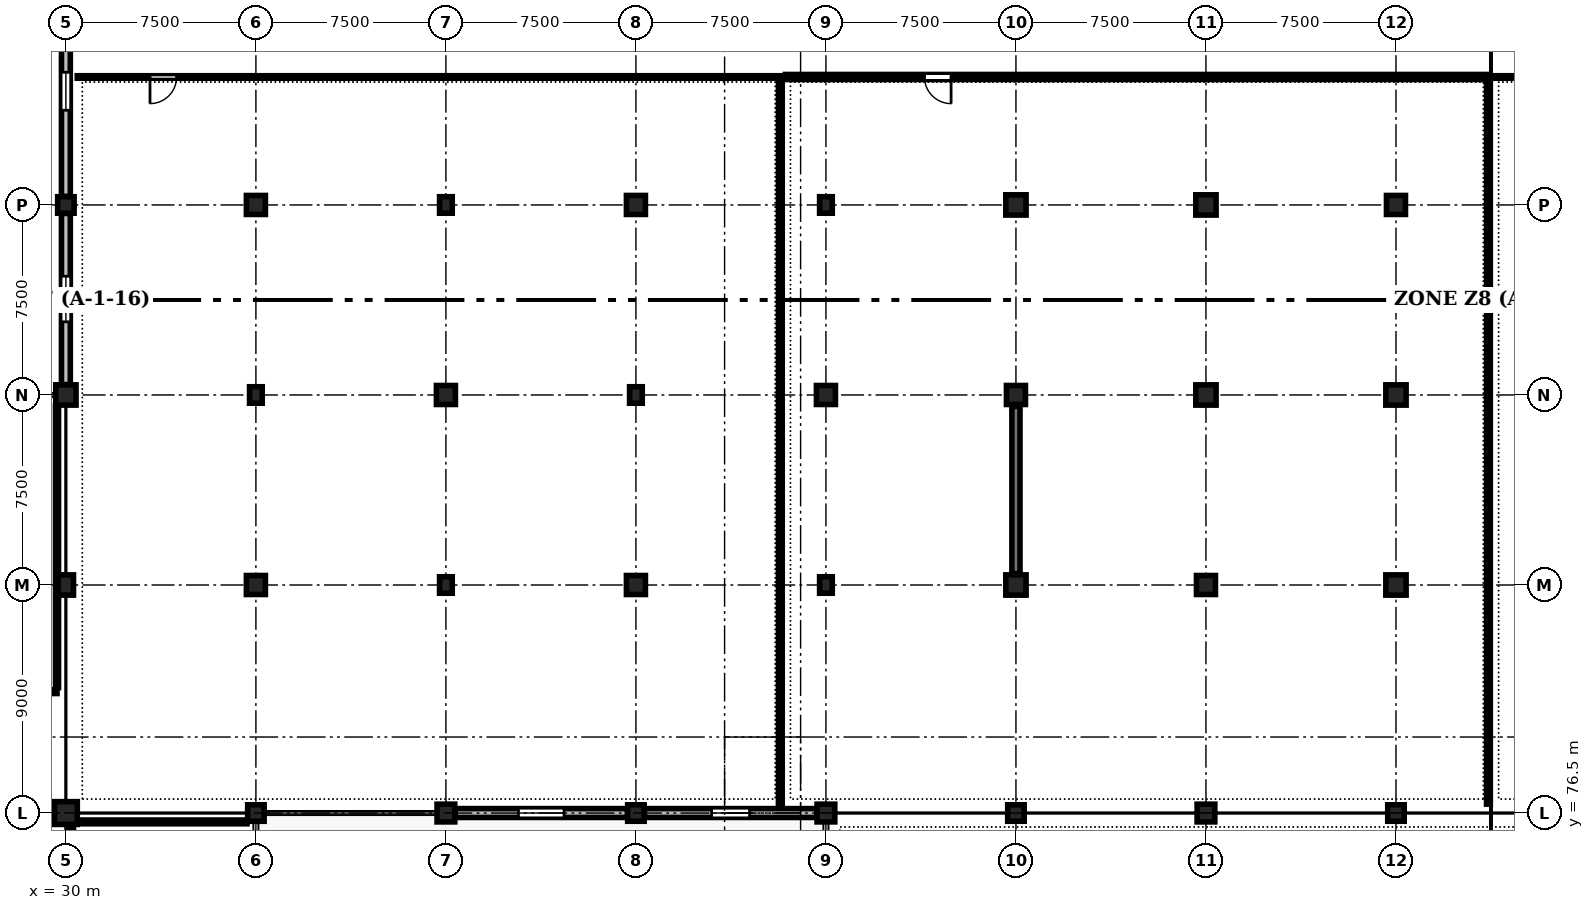
"""IFC4 building model, lengths in metres.
Left out: names, types, materials, properties, quantities, classifications, styles, units other than length and angle.
Written with IfcOpenShell. Run it as: python <this file> out.ifc"""

import sys

from ifc_helpers import new_model, si_unit, direction, frame, frame_2d, origin, origin_2d, place, context, subcontext, project, spatial, rectangle, circle, extrude, element, fill, save


model = new_model("IFC4")
c1 = context("Model", 3, precision=1e-05, world=origin(), true_north=direction((0.0, 1.0)))
c2 = subcontext(c1, "Body", "Model", "MODEL_VIEW")
j1 = project(units=[si_unit("LENGTHUNIT", "METRE"), si_unit("PLANEANGLEUNIT", "RADIAN")], contexts=[c1])
p1 = place(None, origin())
s1 = spatial("IfcSite", under=j1, at=p1, CompositionType="ELEMENT")
p2 = place(p1, origin())
s2 = spatial("IfcBuilding", under=s1, at=p2, CompositionType="ELEMENT")
p3 = place(p2, origin())
s3 = spatial("IfcBuildingStorey", under=s2, at=p3, CompositionType="ELEMENT", Elevation=0.0)
p4 = place(p3, frame((30.0, 76.5, 0.0), z_axis=(0.0, 0.0, 1.0), x_axis=(1.0, 0.0, 0.0)))
e1 = element("IfcColumn", 1, at=p4, inside=s3, PredefinedType="COLUMN", context=c2, shape_type="SweptSolid", body=[
    extrude(rectangle(XDim=0.9, YDim=0.9, at=origin_2d()), origin(), (0.0, 0.0, 1.0), 4.8),
])
p5 = place(p3, frame((30.0, 85.5, 0.0), z_axis=(0.0, 0.0, 1.0), x_axis=(1.0, 0.0, 0.0)))
e2 = element("IfcColumn", 2, at=p5, inside=s3, PredefinedType="COLUMN", context=c2, shape_type="SweptSolid", body=[
    extrude(rectangle(XDim=0.6, YDim=0.8, at=origin_2d()), origin(), (0.0, 0.0, 1.0), 4.8),
])
p6 = place(p3, frame((30.0, 93.0, 0.0), z_axis=(0.0, 0.0, 1.0), x_axis=(1.0, 0.0, 0.0)))
e3 = element("IfcColumn", 3, at=p6, inside=s3, PredefinedType="COLUMN", context=c2, shape_type="SweptSolid", body=[
    extrude(rectangle(XDim=0.8, YDim=0.8, at=origin_2d()), origin(), (0.0, 0.0, 1.0), 4.8),
])
for number, where, z_axis, x_axis in (
    (4, (30.0, 100.5, 0.0), (0.0, 0.0, 1.0), (1.0, 0.0, 0.0)),
    (5, (37.5, 76.5, 0.0), (0.0, 0.0, 1.0), (1.0, 0.0, 0.0)),
):
    element("IfcColumn", number, at=place(p3, frame(where, z_axis=z_axis, x_axis=x_axis)), inside=s3, PredefinedType="COLUMN", context=c2, shape_type="SweptSolid", body=[
        extrude(rectangle(XDim=0.65, YDim=0.65, at=origin_2d()), origin(), (0.0, 0.0, 1.0), 4.8),
    ])
p7 = place(p3, frame((37.5, 85.5, 0.0), z_axis=(0.0, 0.0, 1.0), x_axis=(1.0, 0.0, 0.0)))
e6 = element("IfcColumn", 6, at=p7, inside=s3, PredefinedType="COLUMN", context=c2, shape_type="SweptSolid", body=[
    extrude(rectangle(XDim=0.75, YDim=0.75, at=origin_2d()), origin(), (0.0, 0.0, 1.0), 4.8),
])
p8 = place(p3, frame((37.5, 93.0, 0.0), z_axis=(0.0, 0.0, 1.0), x_axis=(1.0, 0.0, 0.0)))
e7 = element("IfcColumn", 7, at=p8, inside=s3, PredefinedType="COLUMN", context=c2, shape_type="SweptSolid", body=[
    extrude(rectangle(XDim=0.5, YDim=0.65, at=origin_2d()), origin(), (0.0, 0.0, 1.0), 4.8),
])
p9 = place(p3, frame((37.5, 100.5, 0.0), z_axis=(0.0, 0.0, 1.0), x_axis=(1.0, 0.0, 0.0)))
e8 = element("IfcColumn", 8, at=p9, inside=s3, PredefinedType="COLUMN", context=c2, shape_type="SweptSolid", body=[
    extrude(rectangle(XDim=0.75, YDim=0.75, at=origin_2d()), origin(), (0.0, 0.0, 1.0), 4.8),
])
p10 = place(p3, frame((45.0, 76.5, 0.0), z_axis=(0.0, 0.0, 1.0), x_axis=(1.0, 0.0, 0.0)))
e9 = element("IfcColumn", 9, at=p10, inside=s3, PredefinedType="COLUMN", context=c2, shape_type="SweptSolid", body=[
    extrude(rectangle(XDim=0.7, YDim=0.7, at=origin_2d()), origin(), (0.0, 0.0, 1.0), 4.8),
])
p11 = place(p3, frame((45.0, 85.5, 0.0), z_axis=(0.0, 0.0, 1.0), x_axis=(1.0, 0.0, 0.0)))
e10 = element("IfcColumn", 10, at=p11, inside=s3, PredefinedType="COLUMN", context=c2, shape_type="SweptSolid", body=[
    extrude(rectangle(XDim=0.5, YDim=0.65, at=origin_2d()), origin(), (0.0, 0.0, 1.0), 4.8),
])
p12 = place(p3, frame((45.0, 93.0, 0.0), z_axis=(0.0, 0.0, 1.0), x_axis=(1.0, 0.0, 0.0)))
e11 = element("IfcColumn", 11, at=p12, inside=s3, PredefinedType="COLUMN", context=c2, shape_type="SweptSolid", body=[
    extrude(rectangle(XDim=0.75, YDim=0.75, at=origin_2d()), origin(), (0.0, 0.0, 1.0), 4.8),
])
p13 = place(p3, frame((45.0, 100.5, 0.0), z_axis=(0.0, 0.0, 1.0), x_axis=(1.0, 0.0, 0.0)))
e12 = element("IfcColumn", 12, at=p13, inside=s3, PredefinedType="COLUMN", context=c2, shape_type="SweptSolid", body=[
    extrude(rectangle(XDim=0.5, YDim=0.65, at=origin_2d()), origin(), (0.0, 0.0, 1.0), 4.8),
])
p14 = place(p3, frame((52.5, 76.5, 0.0), z_axis=(0.0, 0.0, 1.0), x_axis=(1.0, 0.0, 0.0)))
e13 = element("IfcColumn", 13, at=p14, inside=s3, PredefinedType="COLUMN", context=c2, shape_type="SweptSolid", body=[
    extrude(rectangle(XDim=0.65, YDim=0.65, at=origin_2d()), origin(), (0.0, 0.0, 1.0), 4.8),
])
p15 = place(p3, frame((52.5, 85.5, 0.0), z_axis=(0.0, 0.0, 1.0), x_axis=(1.0, 0.0, 0.0)))
e14 = element("IfcColumn", 14, at=p15, inside=s3, PredefinedType="COLUMN", context=c2, shape_type="SweptSolid", body=[
    extrude(rectangle(XDim=0.75, YDim=0.75, at=origin_2d()), origin(), (0.0, 0.0, 1.0), 4.8),
])
p16 = place(p3, frame((52.5, 93.0, 0.0), z_axis=(0.0, 0.0, 1.0), x_axis=(1.0, 0.0, 0.0)))
e15 = element("IfcColumn", 15, at=p16, inside=s3, PredefinedType="COLUMN", context=c2, shape_type="SweptSolid", body=[
    extrude(rectangle(XDim=0.5, YDim=0.65, at=origin_2d()), origin(), (0.0, 0.0, 1.0), 4.8),
])
p17 = place(p3, frame((52.5, 100.5, 0.0), z_axis=(0.0, 0.0, 1.0), x_axis=(1.0, 0.0, 0.0)))
e16 = element("IfcColumn", 16, at=p17, inside=s3, PredefinedType="COLUMN", context=c2, shape_type="SweptSolid", body=[
    extrude(rectangle(XDim=0.75, YDim=0.75, at=origin_2d()), origin(), (0.0, 0.0, 1.0), 4.8),
])
p18 = place(p3, frame((60.0, 76.5, 0.0), z_axis=(0.0, 0.0, 1.0), x_axis=(1.0, 0.0, 0.0)))
e17 = element("IfcColumn", 17, at=p18, inside=s3, PredefinedType="COLUMN", context=c2, shape_type="SweptSolid", body=[
    extrude(rectangle(XDim=0.7, YDim=0.7, at=origin_2d()), origin(), (0.0, 0.0, 1.0), 4.8),
])
p19 = place(p3, frame((60.0, 85.5, 0.0), z_axis=(0.0, 0.0, 1.0), x_axis=(1.0, 0.0, 0.0)))
e18 = element("IfcColumn", 18, at=p19, inside=s3, PredefinedType="COLUMN", context=c2, shape_type="SweptSolid", body=[
    extrude(rectangle(XDim=0.5, YDim=0.65, at=origin_2d()), origin(), (0.0, 0.0, 1.0), 4.8),
])
p20 = place(p3, frame((60.0, 93.0, 0.0), z_axis=(0.0, 0.0, 1.0), x_axis=(1.0, 0.0, 0.0)))
e19 = element("IfcColumn", 19, at=p20, inside=s3, PredefinedType="COLUMN", context=c2, shape_type="SweptSolid", body=[
    extrude(rectangle(XDim=0.75, YDim=0.75, at=origin_2d()), origin(), (0.0, 0.0, 1.0), 4.8),
])
p21 = place(p3, frame((60.0, 100.5, 0.0), z_axis=(0.0, 0.0, 1.0), x_axis=(1.0, 0.0, 0.0)))
e20 = element("IfcColumn", 20, at=p21, inside=s3, PredefinedType="COLUMN", context=c2, shape_type="SweptSolid", body=[
    extrude(rectangle(XDim=0.5, YDim=0.65, at=origin_2d()), origin(), (0.0, 0.0, 1.0), 4.8),
])
p22 = place(p3, frame((67.5, 76.5, 0.0), z_axis=(0.0, 0.0, 1.0), x_axis=(1.0, 0.0, 0.0)))
e21 = element("IfcColumn", 21, at=p22, inside=s3, PredefinedType="COLUMN", context=c2, shape_type="SweptSolid", body=[
    extrude(rectangle(XDim=0.65, YDim=0.65, at=origin_2d()), origin(), (0.0, 0.0, 1.0), 4.8),
])
p23 = place(p3, frame((67.5, 85.5, 0.0), z_axis=(0.0, 0.0, 1.0), x_axis=(1.0, 0.0, 0.0)))
e22 = element("IfcColumn", 22, at=p23, inside=s3, PredefinedType="COLUMN", context=c2, shape_type="SweptSolid", body=[
    extrude(rectangle(XDim=0.8, YDim=0.8, at=origin_2d()), origin(), (0.0, 0.0, 1.0), 4.8),
])
p24 = place(p3, frame((67.5, 93.0, 0.0), z_axis=(0.0, 0.0, 1.0), x_axis=(1.0, 0.0, 0.0)))
e23 = element("IfcColumn", 23, at=p24, inside=s3, PredefinedType="COLUMN", context=c2, shape_type="SweptSolid", body=[
    extrude(circle(Radius=0.375, at=origin_2d()), origin(), (0.0, 0.0, 1.0), 4.8),
])
p25 = place(p3, frame((67.5, 100.5, 0.0), z_axis=(0.0, 0.0, 1.0), x_axis=(1.0, 0.0, 0.0)))
e24 = element("IfcColumn", 24, at=p25, inside=s3, PredefinedType="COLUMN", context=c2, shape_type="SweptSolid", body=[
    extrude(rectangle(XDim=0.8, YDim=0.8, at=origin_2d()), origin(), (0.0, 0.0, 1.0), 4.8),
])
p26 = place(p3, frame((75.0, 76.5, 0.0), z_axis=(0.0, 0.0, 1.0), x_axis=(1.0, 0.0, 0.0)))
e25 = element("IfcColumn", 25, at=p26, inside=s3, PredefinedType="COLUMN", context=c2, shape_type="SweptSolid", body=[
    extrude(rectangle(XDim=0.7, YDim=0.7, at=origin_2d()), origin(), (0.0, 0.0, 1.0), 4.8),
])
p27 = place(p3, frame((75.0, 85.5, 0.0), z_axis=(0.0, 0.0, 1.0), x_axis=(1.0, 0.0, 0.0)))
e26 = element("IfcColumn", 26, at=p27, inside=s3, PredefinedType="COLUMN", context=c2, shape_type="SweptSolid", body=[
    extrude(circle(Radius=0.375, at=origin_2d()), origin(), (0.0, 0.0, 1.0), 4.8),
])
for number, where, z_axis, x_axis in (
    (27, (75.0, 93.0, 0.0), (0.0, 0.0, 1.0), (1.0, 0.0, 0.0)),
    (28, (75.0, 100.5, 0.0), (0.0, 0.0, 1.0), (1.0, 0.0, 0.0)),
):
    element("IfcColumn", number, at=place(p3, frame(where, z_axis=z_axis, x_axis=x_axis)), inside=s3, PredefinedType="COLUMN", context=c2, shape_type="SweptSolid", body=[
        extrude(rectangle(XDim=0.8, YDim=0.8, at=origin_2d()), origin(), (0.0, 0.0, 1.0), 4.8),
    ])
p28 = place(p3, frame((82.5, 76.5, 0.0), z_axis=(0.0, 0.0, 1.0), x_axis=(1.0, 0.0, 0.0)))
e29 = element("IfcColumn", 29, at=p28, inside=s3, PredefinedType="COLUMN", context=c2, shape_type="SweptSolid", body=[
    extrude(rectangle(XDim=0.65, YDim=0.65, at=origin_2d()), origin(), (0.0, 0.0, 1.0), 4.8),
])
for number, where, z_axis, x_axis in (
    (30, (82.5, 85.5, 0.0), (0.0, 0.0, 1.0), (1.0, 0.0, 0.0)),
    (31, (82.5, 93.0, 0.0), (0.0, 0.0, 1.0), (1.0, 0.0, 0.0)),
):
    element("IfcColumn", number, at=place(p3, frame(where, z_axis=z_axis, x_axis=x_axis)), inside=s3, PredefinedType="COLUMN", context=c2, shape_type="SweptSolid", body=[
        extrude(rectangle(XDim=0.8, YDim=0.8, at=origin_2d()), origin(), (0.0, 0.0, 1.0), 4.8),
    ])
p29 = place(p3, frame((82.5, 100.5, 0.0), z_axis=(0.0, 0.0, 1.0), x_axis=(1.0, 0.0, 0.0)))
e32 = element("IfcColumn", 32, at=p29, inside=s3, PredefinedType="COLUMN", context=c2, shape_type="SweptSolid", body=[
    extrude(circle(Radius=0.375, at=origin_2d()), origin(), (0.0, 0.0, 1.0), 4.8),
])
p30 = place(p3, frame((67.5, 85.95, 0.0), z_axis=(0.0, 0.0, 1.0), x_axis=(0.0, 1.0, 0.0)))
e33 = element("IfcWall", 33, at=p30, inside=s3, PredefinedType="SHEAR", context=c2, shape_type="SweptSolid", body=[
    extrude(rectangle(XDim=6.6, YDim=0.32, at=frame_2d((3.3, 0.0))), origin(), (0.0, 0.0, 1.0), 3.95),
])
p31 = place(p3, frame((30.0, 93.41, 0.0), z_axis=(0.0, 0.0, 1.0), x_axis=(0.0, 1.0, 0.0)))
e34 = element("IfcWall", 34, at=p31, inside=s3, PredefinedType="STANDARD", context=c2, shape_type="SweptSolid", body=[
    extrude(rectangle(XDim=6.755, YDim=0.35, at=frame_2d((3.377, 0.0))), origin(), (0.0, 0.0, 1.0), 3.9),
])
p32 = place(p31, frame((2.478, 0.0, 0.9)))
e35 = element("IfcOpeningElement", 35, at=p32, cuts=e34, PredefinedType="OPENING", context=c2, shape_type="SweptSolid", body=[
    extrude(rectangle(XDim=1.8, YDim=2.4, at=frame_2d((0.9, 1.2))), frame((0.0, 0.185, 0.0), z_axis=(0.0, -1.0, 0.0), x_axis=(1.0, 0.0, 0.0)), (0.0, 0.0, 1.0), 0.37),
])
p33 = place(p3, frame((30.0, 100.835, 0.0), z_axis=(0.0, 0.0, 1.0), x_axis=(0.0, 1.0, 0.0)))
e36 = element("IfcWall", 36, at=p33, inside=s3, PredefinedType="STANDARD", context=c2, shape_type="SweptSolid", body=[
    extrude(rectangle(XDim=8.305, YDim=0.35, at=frame_2d((4.152, 0.0))), origin(), (0.0, 0.0, 1.0), 3.95),
])
p34 = place(p33, frame((3.403, 0.0, 0.9)))
e37 = element("IfcOpeningElement", 37, at=p34, cuts=e36, PredefinedType="OPENING", context=c2, shape_type="SweptSolid", body=[
    extrude(rectangle(XDim=1.5, YDim=2.4, at=frame_2d((0.75, 1.2))), frame((0.0, 0.185, 0.0), z_axis=(0.0, -1.0, 0.0), x_axis=(1.0, 0.0, 0.0)), (0.0, 0.0, 1.0), 0.37),
])
p35 = place(p3, frame((52.165, 76.5, 0.0), z_axis=(0.0, 0.0, 1.0), x_axis=(-1.0, 0.0, 0.0)))
e38 = element("IfcWall", 38, at=p35, inside=s3, PredefinedType="STANDARD", context=c2, shape_type="SweptSolid", body=[
    extrude(rectangle(XDim=6.805, YDim=0.35, at=frame_2d((3.402, 0.0))), origin(), (0.0, 0.0, 1.0), 3.95),
])
p36 = place(p35, frame((2.502, 0.0, 0.9)))
e39 = element("IfcOpeningElement", 39, at=p36, cuts=e38, PredefinedType="OPENING", context=c2, shape_type="SweptSolid", body=[
    extrude(rectangle(XDim=1.8, YDim=2.4, at=frame_2d((0.9, 1.2))), frame((0.0, 0.185, 0.0), z_axis=(0.0, -1.0, 0.0), x_axis=(1.0, 0.0, 0.0)), (0.0, 0.0, 1.0), 0.37),
])
p37 = place(p3, frame((59.64, 76.5, 0.0), z_axis=(0.0, 0.0, 1.0), x_axis=(-1.0, 0.0, 0.0)))
e40 = element("IfcWall", 40, at=p37, inside=s3, PredefinedType="STANDARD", context=c2, shape_type="SweptSolid", body=[
    extrude(rectangle(XDim=6.805, YDim=0.35, at=frame_2d((3.402, 0.0))), origin(), (0.0, 0.0, 1.0), 3.95),
])
p38 = place(p37, frame((2.653, 0.0, 0.9)))
e41 = element("IfcOpeningElement", 41, at=p38, cuts=e40, PredefinedType="OPENING", context=c2, shape_type="SweptSolid", body=[
    extrude(rectangle(XDim=1.5, YDim=2.4, at=frame_2d((0.75, 1.2))), frame((0.0, 0.185, 0.0), z_axis=(0.0, -1.0, 0.0), x_axis=(1.0, 0.0, 0.0)), (0.0, 0.0, 1.0), 0.37),
])
p39 = place(p3, frame((30.2, 76.15, 0.0), z_axis=(0.0, 0.0, 1.0), x_axis=(0.0, -1.0, 0.0)))
e42 = element("IfcWall", 42, at=p39, inside=s3, PredefinedType="STANDARD", context=c2, shape_type="SweptSolid", body=[
    extrude(rectangle(XDim=44.65, YDim=0.2, at=frame_2d((22.325, 0.0))), origin(), (0.0, 0.0, 1.0), 3.935),
])
p40 = place(p39, frame((17.49, 0.0, 0.0)))
e43 = element("IfcOpeningElement", 43, at=p40, cuts=e42, PredefinedType="OPENING", context=c2, shape_type="SweptSolid", body=[
    extrude(rectangle(XDim=1.05, YDim=2.2, at=frame_2d((0.525, 1.1))), frame((0.0, 0.11, 0.0), z_axis=(0.0, -1.0, 0.0), x_axis=(1.0, 0.0, 0.0)), (0.0, 0.0, 1.0), 0.22),
])
p41 = place(p3, frame((58.2, 105.55, 0.0), z_axis=(0.0, 0.0, 1.0), x_axis=(-1.0, 0.0, 0.0)))
e44 = element("IfcWall", 44, at=p41, inside=s3, PredefinedType="PARTITIONING", context=c2, shape_type="SweptSolid", body=[
    extrude(rectangle(XDim=27.75, YDim=0.1, at=frame_2d((13.875, 0.0))), origin(), (0.0, 0.0, 1.0), 4.485),
])
p42 = place(p41, frame((23.83, 0.0, 0.0)))
e45 = element("IfcOpeningElement", 45, at=p42, cuts=e44, PredefinedType="OPENING", context=c2, shape_type="SweptSolid", body=[
    extrude(rectangle(XDim=1.05, YDim=2.2, at=frame_2d((0.525, 1.1))), frame((0.0, 0.06, 0.0), z_axis=(0.0, -1.0, 0.0), x_axis=(1.0, 0.0, 0.0)), (0.0, 0.0, 1.0), 0.12),
])
p43 = place(p3, frame((86.15, 105.55, 0.0), z_axis=(0.0, 0.0, 1.0), x_axis=(-1.0, 0.0, 0.0)))
e46 = element("IfcWall", 46, at=p43, inside=s3, PredefinedType="STANDARD", context=c2, shape_type="SweptSolid", body=[
    extrude(rectangle(XDim=27.75, YDim=0.2, at=frame_2d((13.875, 0.0))), origin(), (0.0, 0.0, 1.0), 4.485),
])
p44 = place(p43, frame((21.21, 0.0, 0.0)))
e47 = element("IfcOpeningElement", 47, at=p44, cuts=e46, PredefinedType="OPENING", context=c2, shape_type="SweptSolid", body=[
    extrude(rectangle(XDim=1.05, YDim=2.2, at=frame_2d((0.525, 1.1))), frame((0.0, 0.11, 0.0), z_axis=(0.0, -1.0, 0.0), x_axis=(1.0, 0.0, 0.0)), (0.0, 0.0, 1.0), 0.22),
])
p45 = place(p3, frame((114.1, 105.55, 0.0), z_axis=(0.0, 0.0, 1.0), x_axis=(-1.0, 0.0, 0.0)))
e48 = element("IfcWall", 48, at=p45, inside=s3, PredefinedType="PARTITIONING", context=c2, shape_type="SweptSolid", body=[
    extrude(rectangle(XDim=27.75, YDim=0.1, at=frame_2d((13.875, 0.0))), origin(), (0.0, 0.0, 1.0), 4.485),
])
p46 = place(p45, frame((5.49, 0.0, 0.0)))
e49 = element("IfcOpeningElement", 49, at=p46, cuts=e48, PredefinedType="OPENING", context=c2, shape_type="SweptSolid", body=[
    extrude(rectangle(XDim=1.05, YDim=2.2, at=frame_2d((0.525, 1.1))), frame((0.0, 0.06, 0.0), z_axis=(0.0, -1.0, 0.0), x_axis=(1.0, 0.0, 0.0)), (0.0, 0.0, 1.0), 0.12),
])
p47 = place(p3, frame((18.45, 81.292, 0.0), z_axis=(0.0, 0.0, 1.0), x_axis=(1.0, 0.0, 0.0)))
e50 = element("IfcWall", 50, at=p47, inside=s3, PredefinedType="PARTITIONING", context=c2, shape_type="SweptSolid", body=[
    extrude(rectangle(XDim=11.2, YDim=0.15, at=frame_2d((5.6, 0.0))), origin(), (0.0, 0.0, 1.0), 4.485),
])
p48 = place(p3, frame((30.2, 76.15, 0.0), z_axis=(0.0, 0.0, 1.0), x_axis=(1.0, 0.0, 0.0)))
e51 = element("IfcWall", 51, at=p48, inside=s3, PredefinedType="PARTITIONING", context=c2, shape_type="SweptSolid", body=[
    extrude(rectangle(XDim=6.95, YDim=0.15, at=frame_2d((3.475, 0.0))), origin(), (0.0, 0.0, 1.0), 3.835),
])
p49 = place(p3, frame((58.2, 76.85, 0.0), z_axis=(0.0, 0.0, 1.0), x_axis=(0.0, 1.0, 0.0)))
e52 = element("IfcWall", 52, at=p49, inside=s3, PredefinedType="PARTITIONING", context=c2, shape_type="SweptSolid", body=[
    extrude(rectangle(XDim=28.7, YDim=0.15, at=frame_2d((14.35, 0.0))), origin(), (0.0, 0.0, 1.0), 4.485),
])
p50 = place(p3, frame((86.15, 76.85, 0.0), z_axis=(0.0, 0.0, 1.0), x_axis=(0.0, 1.0, 0.0)))
e53 = element("IfcWall", 53, at=p50, inside=s3, PredefinedType="PARTITIONING", context=c2, shape_type="SweptSolid", body=[
    extrude(rectangle(XDim=28.7, YDim=0.15, at=frame_2d((14.35, 0.0))), origin(), (0.0, 0.0, 1.0), 4.085),
])
p51 = place(p3, frame((29.65, 81.451, 0.0), z_axis=(0.0, 0.0, 1.0), x_axis=(0.0, 1.0, 0.0)))
e54 = element("IfcWall", 54, at=p51, inside=s3, PredefinedType="PARTITIONING", context=c2, shape_type="SweptSolid", body=[
    extrude(rectangle(XDim=11.119, YDim=0.12, at=frame_2d((5.559, 0.0))), origin(), (0.0, 0.0, 1.0), 3.785),
])
p52 = place(p32, origin())
e55 = element("IfcWindow", 55, at=p52, inside=s3, PartitioningType="SINGLE_PANEL", PredefinedType="WINDOW", context=c2, shape_type="SweptSolid", body=[
    extrude(rectangle(XDim=1.8, YDim=2.4, at=frame_2d((0.9, 1.2))), frame((0.0, 0.03, 0.0), z_axis=(0.0, -1.0, 0.0), x_axis=(1.0, 0.0, 0.0)), (0.0, 0.0, 1.0), 0.06),
])
fill(e35, e55)
p53 = place(p34, origin())
e56 = element("IfcWindow", 56, at=p53, inside=s3, PartitioningType="SINGLE_PANEL", PredefinedType="WINDOW", context=c2, shape_type="SweptSolid", body=[
    extrude(rectangle(XDim=1.5, YDim=2.4, at=frame_2d((0.75, 1.2))), frame((0.0, 0.03, 0.0), z_axis=(0.0, -1.0, 0.0), x_axis=(1.0, 0.0, 0.0)), (0.0, 0.0, 1.0), 0.06),
])
fill(e37, e56)
p54 = place(p36, origin())
e57 = element("IfcWindow", 57, at=p54, inside=s3, PartitioningType="SINGLE_PANEL", PredefinedType="WINDOW", context=c2, shape_type="SweptSolid", body=[
    extrude(rectangle(XDim=1.8, YDim=2.4, at=frame_2d((0.9, 1.2))), frame((0.0, 0.03, 0.0), z_axis=(0.0, -1.0, 0.0), x_axis=(1.0, 0.0, 0.0)), (0.0, 0.0, 1.0), 0.06),
])
fill(e39, e57)
p55 = place(p38, origin())
e58 = element("IfcWindow", 58, at=p55, inside=s3, PartitioningType="SINGLE_PANEL", PredefinedType="WINDOW", context=c2, shape_type="SweptSolid", body=[
    extrude(rectangle(XDim=1.5, YDim=2.4, at=frame_2d((0.75, 1.2))), frame((0.0, 0.03, 0.0), z_axis=(0.0, -1.0, 0.0), x_axis=(1.0, 0.0, 0.0)), (0.0, 0.0, 1.0), 0.06),
])
fill(e41, e58)
p56 = place(p42, origin())
e59 = element("IfcDoor", 59, at=p56, inside=s3, OperationType="SINGLE_SWING_RIGHT", PredefinedType="DOOR", context=c2, shape_type="SweptSolid", body=[
    extrude(rectangle(XDim=1.05, YDim=2.2, at=frame_2d((0.525, 1.1))), frame((0.0, 0.025, 0.0), z_axis=(0.0, -1.0, 0.0), x_axis=(1.0, 0.0, 0.0)), (0.0, 0.0, 1.0), 0.05),
])
fill(e45, e59)
p57 = place(p44, origin())
e60 = element("IfcDoor", 60, at=p57, inside=s3, OperationType="SINGLE_SWING_LEFT", PredefinedType="DOOR", context=c2, shape_type="SweptSolid", body=[
    extrude(rectangle(XDim=1.05, YDim=2.2, at=frame_2d((0.525, 1.1))), frame((0.0, 0.025, 0.0), z_axis=(0.0, -1.0, 0.0), x_axis=(1.0, 0.0, 0.0)), (0.0, 0.0, 1.0), 0.05),
])
fill(e47, e60)
save(model, sys.argv[1])
